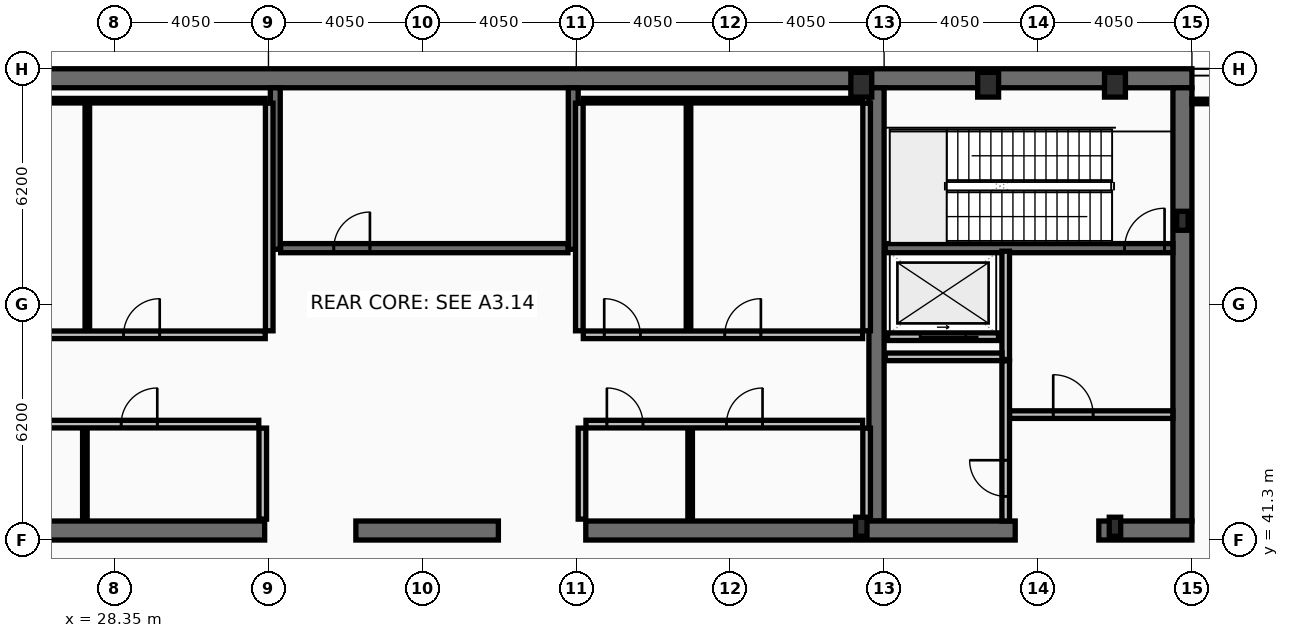
"""IFC4 building model, lengths in metres.
Left out: names, types, materials, properties, quantities, classifications, styles, units other than length and angle.
Written with IfcOpenShell. Run it as: python <this file> out.ifc"""

import sys

from ifc_helpers import new_model, si_unit, direction, frame, frame_2d, origin, origin_2d, place, context, subcontext, project, spatial, rectangle, hollow_rectangle, i_section, extrude, element, fill, save


model = new_model("IFC4")
c1 = context("Model", 3, precision=1e-05, world=origin(), true_north=direction((0.0, 1.0)))
c2 = subcontext(c1, "Body", "Model", "MODEL_VIEW")
j1 = project(units=[si_unit("LENGTHUNIT", "METRE"), si_unit("PLANEANGLEUNIT", "RADIAN")], contexts=[c1])
p1 = place(None, origin())
s1 = spatial("IfcSite", under=j1, at=p1, CompositionType="ELEMENT")
p2 = place(p1, origin())
s2 = spatial("IfcBuilding", under=s1, at=p2, CompositionType="ELEMENT")
p3 = place(p2, frame((0.0, 0.0, 361.8)))
s3 = spatial("IfcBuildingStorey", under=s2, at=p3, CompositionType="ELEMENT", Elevation=361.8)
p4 = place(p3, frame((16.2, 53.45, 0.0), z_axis=(0.0, 0.0, 1.0), x_axis=(1.0, 0.0, 0.0)))
e1 = element("IfcWall", 1, at=p4, inside=s3, PredefinedType="SHEAR", context=c2, shape_type="SweptSolid", body=[
    extrude(rectangle(XDim=40.5, YDim=0.5, at=frame_2d((20.25, 0.0))), origin(), (0.0, 0.0, 1.0), 5.4),
])
p5 = place(p3, frame((56.45, 53.2, 0.0), z_axis=(0.0, 0.0, 1.0), x_axis=(0.0, -1.0, 0.0)))
e2 = element("IfcWall", 2, at=p5, inside=s3, PredefinedType="SHEAR", context=c2, shape_type="SweptSolid", body=[
    extrude(rectangle(XDim=11.4, YDim=0.5, at=frame_2d((5.7, 0.0))), origin(), (0.0, 0.0, 1.0), 5.4),
])
p6 = place(p3, frame((48.4, 41.8, 0.0), z_axis=(0.0, 0.0, 1.0), x_axis=(0.0, 1.0, 0.0)))
e3 = element("IfcWall", 3, at=p6, inside=s3, PredefinedType="SHEAR", context=c2, shape_type="SweptSolid", body=[
    extrude(rectangle(XDim=11.4, YDim=0.4, at=frame_2d((5.7, 0.0))), origin(), (0.0, 0.0, 1.0), 5.4),
])
p7 = place(p3, frame((32.3, 41.55, 0.0), z_axis=(0.0, 0.0, 1.0), x_axis=(-1.0, 0.0, 0.0)))
e4 = element("IfcWall", 4, at=p7, inside=s3, PredefinedType="SHEAR", context=c2, shape_type="SweptSolid", body=[
    extrude(rectangle(XDim=11.45, YDim=0.5, at=frame_2d((5.725, 0.0))), origin(), (0.0, 0.0, 1.0), 5.4),
])
p8 = place(p3, frame((38.45, 41.55, 0.0), z_axis=(0.0, 0.0, 1.0), x_axis=(-1.0, 0.0, 0.0)))
e5 = element("IfcWall", 5, at=p8, inside=s3, PredefinedType="SHEAR", context=c2, shape_type="SweptSolid", body=[
    extrude(rectangle(XDim=3.75, YDim=0.5, at=frame_2d((1.875, 0.0))), origin(), (0.0, 0.0, 1.0), 5.4),
])
p9 = place(p3, frame((52.05, 41.55, 0.0), z_axis=(0.0, 0.0, 1.0), x_axis=(-1.0, 0.0, 0.0)))
e6 = element("IfcWall", 6, at=p9, inside=s3, PredefinedType="SHEAR", context=c2, shape_type="SweptSolid", body=[
    extrude(rectangle(XDim=11.3, YDim=0.5, at=frame_2d((5.65, 0.0))), origin(), (0.0, 0.0, 1.0), 5.4),
])
p10 = place(p3, frame((56.7, 41.55, 0.0), z_axis=(0.0, 0.0, 1.0), x_axis=(-1.0, 0.0, 0.0)))
e7 = element("IfcWall", 7, at=p10, inside=s3, PredefinedType="SHEAR", context=c2, shape_type="SweptSolid", body=[
    extrude(rectangle(XDim=2.45, YDim=0.5, at=frame_2d((1.225, 0.0))), origin(), (0.0, 0.0, 1.0), 5.4),
])
for number, where, z_axis, x_axis in (
    (8, (32.58, 48.95, 0.0), (0.0, 0.0, 1.0), (0.0, 1.0, 0.0)),
    (9, (40.42, 48.95, 0.0), (0.0, 0.0, 1.0), (0.0, 1.0, 0.0)),
):
    element("IfcWall", number, at=place(p3, frame(where, z_axis=z_axis, x_axis=x_axis)), inside=s3, PredefinedType="SHEAR", context=c2, shape_type="SweptSolid", body=[
        extrude(rectangle(XDim=4.25, YDim=0.26, at=frame_2d((2.125, 0.0))), origin(), (0.0, 0.0, 1.0), 5.4),
    ])
p11 = place(p3, frame((48.63, 48.98, 0.0), z_axis=(0.0, 0.0, 1.0), x_axis=(1.0, 0.0, 0.0)))
e10 = element("IfcWall", 10, at=p11, inside=s3, PredefinedType="SHEAR", context=c2, shape_type="SweptSolid", body=[
    extrude(rectangle(XDim=7.57, YDim=0.24, at=frame_2d((3.785, 0.0))), origin(), (0.0, 0.0, 1.0), 5.4),
])
p12 = place(p11, frame((6.3, 0.0, 0.0)))
e11 = element("IfcOpeningElement", 11, at=p12, cuts=e10, PredefinedType="OPENING", context=c2, shape_type="SweptSolid", body=[
    extrude(rectangle(XDim=1.05, YDim=2.15, at=frame_2d((0.525, 1.075))), frame((0.0, 0.13, 0.0), z_axis=(0.0, -1.0, 0.0), x_axis=(1.0, 0.0, 0.0)), (0.0, 0.0, 1.0), 0.26),
])
p13 = place(p3, frame((32.72, 48.98, 0.0), z_axis=(0.0, 0.0, 1.0), x_axis=(1.0, 0.0, 0.0)))
e12 = element("IfcWall", 12, at=p13, inside=s3, PredefinedType="SHEAR", context=c2, shape_type="SweptSolid", body=[
    extrude(rectangle(XDim=7.56, YDim=0.24, at=frame_2d((3.78, 0.0))), origin(), (0.0, 0.0, 1.0), 5.4),
])
p14 = place(p13, frame((1.4, 0.0, 0.0)))
e13 = element("IfcOpeningElement", 13, at=p14, cuts=e12, PredefinedType="OPENING", context=c2, shape_type="SweptSolid", body=[
    extrude(rectangle(XDim=0.95, YDim=2.1, at=frame_2d((0.475, 1.05))), frame((0.0, 0.13, 0.0), z_axis=(0.0, -1.0, 0.0), x_axis=(1.0, 0.0, 0.0)), (0.0, 0.0, 1.0), 0.26),
])
for number, where, z_axis, x_axis in (
    (14, (48.0, 53.28, 0.0), (0.0, 0.0, 1.0), (1.0, 0.0, 0.0)),
    (15, (51.337, 53.28, 0.0), (0.0, 0.0, 1.0), (1.0, 0.0, 0.0)),
    (16, (54.675, 53.28, 0.0), (0.0, 0.0, 1.0), (1.0, 0.0, 0.0)),
):
    element("IfcColumn", number, at=place(p3, frame(where, z_axis=z_axis, x_axis=x_axis)), inside=s3, PredefinedType="COLUMN", context=c2, shape_type="SweptSolid", body=[
        extrude(hollow_rectangle(XDim=0.55, YDim=0.65, WallThickness=0.04, at=origin_2d()), origin(), (0.0, 0.0, 1.0), 5.6),
    ])
for number, where, z_axis, x_axis in (
    (17, (56.45, 49.7, 0.0), (0.0, 0.0, 1.0), (1.0, 0.0, 0.0)),
    (18, (48.0, 41.65, 0.0), (0.0, 0.0, 1.0), (1.0, 0.0, 0.0)),
    (19, (54.675, 41.65, 0.0), (0.0, 0.0, 1.0), (1.0, 0.0, 0.0)),
):
    element("IfcColumn", number, at=place(p3, frame(where, z_axis=z_axis, x_axis=x_axis)), inside=s3, PredefinedType="COLUMN", context=c2, shape_type="SweptSolid", body=[
        extrude(i_section(OverallWidth=0.3, OverallDepth=0.5, WebThickness=0.014, FlangeThickness=0.028, at=origin_2d()), origin(), (0.0, 0.0, 1.0), 5.6),
    ])
p15 = place(p3, frame((51.61, 46.65, 0.0), z_axis=(0.0, 0.0, 1.0), x_axis=(-1.0, 0.0, 0.0)))
e20 = element("IfcWall", 20, at=p15, inside=s3, PredefinedType="PARTITIONING", context=c2, shape_type="SweptSolid", body=[
    extrude(rectangle(XDim=2.92, YDim=0.2, at=frame_2d((1.46, 0.0))), origin(), (0.0, 0.0, 1.0), 5.4),
])
p16 = place(p15, frame((0.86, 0.0, 0.0)))
e21 = element("IfcOpeningElement", 21, at=p16, cuts=e20, PredefinedType="OPENING", context=c2, shape_type="SweptSolid", body=[
    extrude(rectangle(XDim=1.2, YDim=2.18, at=frame_2d((0.6, 1.09))), frame((0.0, 0.11, 0.0), z_axis=(0.0, -1.0, 0.0), x_axis=(1.0, 0.0, 0.0)), (0.0, 0.0, 1.0), 0.22),
])
p17 = place(p3, frame((51.8, 46.05, 0.0), z_axis=(0.0, 0.0, 1.0), x_axis=(0.0, 1.0, 0.0)))
e22 = element("IfcWall", 22, at=p17, inside=s3, PredefinedType="PARTITIONING", context=c2, shape_type="SweptSolid", body=[
    extrude(rectangle(XDim=2.85, YDim=0.2, at=frame_2d((1.425, 0.0))), origin(), (0.0, 0.0, 1.0), 5.4),
])
p18 = place(p3, frame((51.9, 44.6, 0.0), z_axis=(0.0, 0.0, 1.0), x_axis=(1.0, 0.0, 0.0)))
e23 = element("IfcWall", 23, at=p18, inside=s3, PredefinedType="PARTITIONING", context=c2, shape_type="SweptSolid", body=[
    extrude(rectangle(XDim=4.3, YDim=0.2, at=frame_2d((2.15, 0.0))), origin(), (0.0, 0.0, 1.0), 5.4),
])
p19 = place(p18, frame((1.15, 0.0, 0.0)))
e24 = element("IfcOpeningElement", 24, at=p19, cuts=e23, PredefinedType="OPENING", context=c2, shape_type="SweptSolid", body=[
    extrude(rectangle(XDim=1.05, YDim=2.15, at=frame_2d((0.525, 1.075))), frame((0.0, 0.11, 0.0), z_axis=(0.0, -1.0, 0.0), x_axis=(1.0, 0.0, 0.0)), (0.0, 0.0, 1.0), 0.22),
])
p20 = place(p3, frame((48.63, 46.12, 0.0), z_axis=(0.0, 0.0, 1.0), x_axis=(1.0, 0.0, 0.0)))
e25 = element("IfcWall", 25, at=p20, inside=s3, PredefinedType="PARTITIONING", context=c2, shape_type="SweptSolid", body=[
    extrude(rectangle(XDim=3.07, YDim=0.2, at=frame_2d((1.535, 0.0))), origin(), (0.0, 0.0, 1.0), 5.4),
])
p21 = place(p3, frame((51.8, 41.8, 0.0), z_axis=(0.0, 0.0, 1.0), x_axis=(0.0, 1.0, 0.0)))
e26 = element("IfcWall", 26, at=p21, inside=s3, PredefinedType="PARTITIONING", context=c2, shape_type="SweptSolid", body=[
    extrude(rectangle(XDim=4.215, YDim=0.2, at=frame_2d((2.107, 0.0))), origin(), (0.0, 0.0, 1.0), 5.4),
])
p22 = place(p21, frame((0.65, 0.0, 0.0)))
e27 = element("IfcOpeningElement", 27, at=p22, cuts=e26, PredefinedType="OPENING", context=c2, shape_type="SweptSolid", body=[
    extrude(rectangle(XDim=0.95, YDim=2.1, at=frame_2d((0.475, 1.05))), frame((0.0, 0.11, 0.0), z_axis=(0.0, -1.0, 0.0), x_axis=(1.0, 0.0, 0.0)), (0.0, 0.0, 1.0), 0.22),
])
p23 = place(p3, frame((32.42, 46.805, 0.0), z_axis=(0.0, 0.0, 1.0), x_axis=(0.0, 1.0, 0.0)))
e28 = element("IfcWall", 28, at=p23, inside=s3, PredefinedType="PARTITIONING", context=c2, shape_type="SweptSolid", body=[
    extrude(rectangle(XDim=5.99, YDim=0.2, at=frame_2d((2.995, 0.0))), origin(), (0.0, 0.0, 1.0), 5.4),
])
p24 = place(p3, frame((24.805, 52.86, 0.0), z_axis=(0.0, 0.0, 1.0), x_axis=(1.0, 0.0, 0.0)))
e29 = element("IfcWall", 29, at=p24, inside=s3, PredefinedType="PARTITIONING", context=c2, shape_type="SweptSolid", body=[
    extrude(rectangle(XDim=7.51, YDim=0.12, at=frame_2d((3.755, 0.0))), origin(), (0.0, 0.0, 1.0), 5.4),
])
p25 = place(p3, frame((27.634, 46.805, 0.0), z_axis=(0.0, 0.0, 1.0), x_axis=(0.0, 1.0, 0.0)))
e30 = element("IfcWall", 30, at=p25, inside=s3, PredefinedType="PARTITIONING", context=c2, shape_type="SweptSolid", body=[
    extrude(rectangle(XDim=5.99, YDim=0.12, at=frame_2d((2.995, 0.0))), origin(), (0.0, 0.0, 1.0), 5.4),
])
p26 = place(p3, frame((24.805, 46.7, 0.0), z_axis=(0.0, 0.0, 1.0), x_axis=(1.0, 0.0, 0.0)))
e31 = element("IfcWall", 31, at=p26, inside=s3, PredefinedType="PARTITIONING", context=c2, shape_type="SweptSolid", body=[
    extrude(rectangle(XDim=7.51, YDim=0.2, at=frame_2d((3.755, 0.0))), origin(), (0.0, 0.0, 1.0), 5.4),
])
p27 = place(p26, frame((0.55, 0.0, 0.0)))
e32 = element("IfcOpeningElement", 32, at=p27, cuts=e31, PredefinedType="OPENING", context=c2, shape_type="SweptSolid", body=[
    extrude(rectangle(XDim=0.95, YDim=2.1, at=frame_2d((0.475, 1.05))), frame((0.0, 0.11, 0.0), z_axis=(0.0, -1.0, 0.0), x_axis=(1.0, 0.0, 0.0)), (0.0, 0.0, 1.0), 0.22),
])
p28 = place(p26, frame((3.784, 0.0, 0.0)))
e33 = element("IfcOpeningElement", 33, at=p28, cuts=e31, PredefinedType="OPENING", context=c2, shape_type="SweptSolid", body=[
    extrude(rectangle(XDim=0.95, YDim=2.1, at=frame_2d((0.475, 1.05))), frame((0.0, 0.11, 0.0), z_axis=(0.0, -1.0, 0.0), x_axis=(1.0, 0.0, 0.0)), (0.0, 0.0, 1.0), 0.22),
])
p29 = place(p3, frame((32.25, 41.85, 0.0), z_axis=(0.0, 0.0, 1.0), x_axis=(0.0, 1.0, 0.0)))
e34 = element("IfcWall", 34, at=p29, inside=s3, PredefinedType="PARTITIONING", context=c2, shape_type="SweptSolid", body=[
    extrude(rectangle(XDim=2.395, YDim=0.2, at=frame_2d((1.198, 0.0))), origin(), (0.0, 0.0, 1.0), 5.4),
])
p30 = place(p3, frame((27.569, 41.85, 0.0), z_axis=(0.0, 0.0, 1.0), x_axis=(0.0, 1.0, 0.0)))
e35 = element("IfcWall", 35, at=p30, inside=s3, PredefinedType="PARTITIONING", context=c2, shape_type="SweptSolid", body=[
    extrude(rectangle(XDim=2.395, YDim=0.12, at=frame_2d((1.198, 0.0))), origin(), (0.0, 0.0, 1.0), 5.4),
])
p31 = place(p3, frame((24.805, 44.35, 0.0), z_axis=(0.0, 0.0, 1.0), x_axis=(1.0, 0.0, 0.0)))
e36 = element("IfcWall", 36, at=p31, inside=s3, PredefinedType="PARTITIONING", context=c2, shape_type="SweptSolid", body=[
    extrude(rectangle(XDim=7.34, YDim=0.2, at=frame_2d((3.67, 0.0))), origin(), (0.0, 0.0, 1.0), 5.4),
])
p32 = place(p31, frame((0.55, 0.0, 0.0)))
e37 = element("IfcOpeningElement", 37, at=p32, cuts=e36, PredefinedType="OPENING", context=c2, shape_type="SweptSolid", body=[
    extrude(rectangle(XDim=0.95, YDim=2.1, at=frame_2d((0.475, 1.05))), frame((0.0, 0.11, 0.0), z_axis=(0.0, -1.0, 0.0), x_axis=(1.0, 0.0, 0.0)), (0.0, 0.0, 1.0), 0.22),
])
p33 = place(p31, frame((3.719, 0.0, 0.0)))
e38 = element("IfcOpeningElement", 38, at=p33, cuts=e36, PredefinedType="OPENING", context=c2, shape_type="SweptSolid", body=[
    extrude(rectangle(XDim=0.95, YDim=2.1, at=frame_2d((0.475, 1.05))), frame((0.0, 0.11, 0.0), z_axis=(0.0, -1.0, 0.0), x_axis=(1.0, 0.0, 0.0)), (0.0, 0.0, 1.0), 0.22),
])
for number, where, z_axis, x_axis in (
    (39, (40.58, 46.805, 0.0), (0.0, 0.0, 1.0), (0.0, 1.0, 0.0)),
    (40, (48.14, 46.805, 0.0), (0.0, 0.0, 1.0), (0.0, 1.0, 0.0)),
):
    element("IfcWall", number, at=place(p3, frame(where, z_axis=z_axis, x_axis=x_axis)), inside=s3, PredefinedType="PARTITIONING", context=c2, shape_type="SweptSolid", body=[
        extrude(rectangle(XDim=5.99, YDim=0.2, at=frame_2d((2.995, 0.0))), origin(), (0.0, 0.0, 1.0), 5.4),
    ])
p34 = place(p3, frame((40.685, 52.86, 0.0), z_axis=(0.0, 0.0, 1.0), x_axis=(1.0, 0.0, 0.0)))
e41 = element("IfcWall", 41, at=p34, inside=s3, PredefinedType="PARTITIONING", context=c2, shape_type="SweptSolid", body=[
    extrude(rectangle(XDim=7.35, YDim=0.12, at=frame_2d((3.675, 0.0))), origin(), (0.0, 0.0, 1.0), 5.4),
])
p35 = place(p3, frame((43.453, 46.805, 0.0), z_axis=(0.0, 0.0, 1.0), x_axis=(0.0, 1.0, 0.0)))
e42 = element("IfcWall", 42, at=p35, inside=s3, PredefinedType="PARTITIONING", context=c2, shape_type="SweptSolid", body=[
    extrude(rectangle(XDim=5.99, YDim=0.12, at=frame_2d((2.995, 0.0))), origin(), (0.0, 0.0, 1.0), 5.4),
])
p36 = place(p3, frame((40.685, 46.7, 0.0), z_axis=(0.0, 0.0, 1.0), x_axis=(1.0, 0.0, 0.0)))
e43 = element("IfcWall", 43, at=p36, inside=s3, PredefinedType="PARTITIONING", context=c2, shape_type="SweptSolid", body=[
    extrude(rectangle(XDim=7.35, YDim=0.2, at=frame_2d((3.675, 0.0))), origin(), (0.0, 0.0, 1.0), 5.4),
])
p37 = place(p36, frame((0.55, 0.0, 0.0)))
e44 = element("IfcOpeningElement", 44, at=p37, cuts=e43, PredefinedType="OPENING", context=c2, shape_type="SweptSolid", body=[
    extrude(rectangle(XDim=0.95, YDim=2.1, at=frame_2d((0.475, 1.05))), frame((0.0, 0.11, 0.0), z_axis=(0.0, -1.0, 0.0), x_axis=(1.0, 0.0, 0.0)), (0.0, 0.0, 1.0), 0.22),
])
p38 = place(p36, frame((3.723, 0.0, 0.0)))
e45 = element("IfcOpeningElement", 45, at=p38, cuts=e43, PredefinedType="OPENING", context=c2, shape_type="SweptSolid", body=[
    extrude(rectangle(XDim=0.95, YDim=2.1, at=frame_2d((0.475, 1.05))), frame((0.0, 0.11, 0.0), z_axis=(0.0, -1.0, 0.0), x_axis=(1.0, 0.0, 0.0)), (0.0, 0.0, 1.0), 0.22),
])
for number, where, z_axis, x_axis in (
    (46, (40.65, 41.85, 0.0), (0.0, 0.0, 1.0), (0.0, 1.0, 0.0)),
    (47, (48.14, 41.85, 0.0), (0.0, 0.0, 1.0), (0.0, 1.0, 0.0)),
):
    element("IfcWall", number, at=place(p3, frame(where, z_axis=z_axis, x_axis=x_axis)), inside=s3, PredefinedType="PARTITIONING", context=c2, shape_type="SweptSolid", body=[
        extrude(rectangle(XDim=2.395, YDim=0.2, at=frame_2d((1.198, 0.0))), origin(), (0.0, 0.0, 1.0), 5.4),
    ])
p39 = place(p3, frame((43.496, 41.85, 0.0), z_axis=(0.0, 0.0, 1.0), x_axis=(0.0, 1.0, 0.0)))
e48 = element("IfcWall", 48, at=p39, inside=s3, PredefinedType="PARTITIONING", context=c2, shape_type="SweptSolid", body=[
    extrude(rectangle(XDim=2.395, YDim=0.12, at=frame_2d((1.198, 0.0))), origin(), (0.0, 0.0, 1.0), 5.4),
])
p40 = place(p3, frame((40.755, 44.35, 0.0), z_axis=(0.0, 0.0, 1.0), x_axis=(1.0, 0.0, 0.0)))
e49 = element("IfcWall", 49, at=p40, inside=s3, PredefinedType="PARTITIONING", context=c2, shape_type="SweptSolid", body=[
    extrude(rectangle(XDim=7.28, YDim=0.2, at=frame_2d((3.64, 0.0))), origin(), (0.0, 0.0, 1.0), 5.4),
])
p41 = place(p40, frame((0.55, 0.0, 0.0)))
e50 = element("IfcOpeningElement", 50, at=p41, cuts=e49, PredefinedType="OPENING", context=c2, shape_type="SweptSolid", body=[
    extrude(rectangle(XDim=0.95, YDim=2.1, at=frame_2d((0.475, 1.05))), frame((0.0, 0.11, 0.0), z_axis=(0.0, -1.0, 0.0), x_axis=(1.0, 0.0, 0.0)), (0.0, 0.0, 1.0), 0.22),
])
p42 = place(p40, frame((3.696, 0.0, 0.0)))
e51 = element("IfcOpeningElement", 51, at=p42, cuts=e49, PredefinedType="OPENING", context=c2, shape_type="SweptSolid", body=[
    extrude(rectangle(XDim=0.95, YDim=2.1, at=frame_2d((0.475, 1.05))), frame((0.0, 0.11, 0.0), z_axis=(0.0, -1.0, 0.0), x_axis=(1.0, 0.0, 0.0)), (0.0, 0.0, 1.0), 0.22),
])
p43 = place(p3, frame((56.7, 52.84, 0.0), z_axis=(0.0, 0.0, 1.0), x_axis=(1.0, 0.0, 0.0)))
e52 = element("IfcWall", 52, at=p43, inside=s3, PredefinedType="PARTITIONING", context=c2, shape_type="SweptSolid", body=[
    extrude(rectangle(XDim=4.105, YDim=0.12, at=frame_2d((2.052, 0.0))), origin(), (0.0, 0.0, 1.0), 5.4),
])
p44 = place(p12, origin())
e53 = element("IfcDoor", 53, at=p44, inside=s3, OperationType="SINGLE_SWING_RIGHT", PredefinedType="DOOR", context=c2, shape_type="SweptSolid", body=[
    extrude(rectangle(XDim=1.05, YDim=2.15, at=frame_2d((0.525, 1.075))), frame((0.0, 0.025, 0.0), z_axis=(0.0, -1.0, 0.0), x_axis=(1.0, 0.0, 0.0)), (0.0, 0.0, 1.0), 0.05),
])
fill(e11, e53)
p45 = place(p14, origin())
e54 = element("IfcDoor", 54, at=p45, inside=s3, OperationType="SINGLE_SWING_RIGHT", PredefinedType="DOOR", context=c2, shape_type="SweptSolid", body=[
    extrude(rectangle(XDim=0.95, YDim=2.1, at=frame_2d((0.475, 1.05))), frame((0.0, 0.025, 0.0), z_axis=(0.0, -1.0, 0.0), x_axis=(1.0, 0.0, 0.0)), (0.0, 0.0, 1.0), 0.05),
])
fill(e13, e54)
p46 = place(p16, origin())
e55 = element("IfcDoor", 55, at=p46, inside=s3, OperationType="SLIDING_TO_LEFT", PredefinedType="DOOR", context=c2, shape_type="SweptSolid", body=[
    extrude(rectangle(XDim=1.2, YDim=2.18, at=frame_2d((0.6, 1.09))), frame((0.0, 0.025, 0.0), z_axis=(0.0, -1.0, 0.0), x_axis=(1.0, 0.0, 0.0)), (0.0, 0.0, 1.0), 0.05),
])
fill(e21, e55)
p47 = place(p19, origin())
e56 = element("IfcDoor", 56, at=p47, inside=s3, OperationType="SINGLE_SWING_LEFT", PredefinedType="DOOR", context=c2, shape_type="SweptSolid", body=[
    extrude(rectangle(XDim=1.05, YDim=2.15, at=frame_2d((0.525, 1.075))), frame((0.0, 0.025, 0.0), z_axis=(0.0, -1.0, 0.0), x_axis=(1.0, 0.0, 0.0)), (0.0, 0.0, 1.0), 0.05),
])
fill(e24, e56)
p48 = place(p22, origin())
e57 = element("IfcDoor", 57, at=p48, inside=s3, OperationType="SINGLE_SWING_RIGHT", PredefinedType="DOOR", context=c2, shape_type="SweptSolid", body=[
    extrude(rectangle(XDim=0.95, YDim=2.1, at=frame_2d((0.475, 1.05))), frame((0.0, 0.025, 0.0), z_axis=(0.0, -1.0, 0.0), x_axis=(1.0, 0.0, 0.0)), (0.0, 0.0, 1.0), 0.05),
])
fill(e27, e57)
p49 = place(p28, origin())
e58 = element("IfcDoor", 58, at=p49, inside=s3, OperationType="SINGLE_SWING_RIGHT", PredefinedType="DOOR", context=c2, shape_type="SweptSolid", body=[
    extrude(rectangle(XDim=0.95, YDim=2.1, at=frame_2d((0.475, 1.05))), frame((0.0, 0.025, 0.0), z_axis=(0.0, -1.0, 0.0), x_axis=(1.0, 0.0, 0.0)), (0.0, 0.0, 1.0), 0.05),
])
fill(e33, e58)
p50 = place(p33, origin())
e59 = element("IfcDoor", 59, at=p50, inside=s3, OperationType="SINGLE_SWING_RIGHT", PredefinedType="DOOR", context=c2, shape_type="SweptSolid", body=[
    extrude(rectangle(XDim=0.95, YDim=2.1, at=frame_2d((0.475, 1.05))), frame((0.0, 0.025, 0.0), z_axis=(0.0, -1.0, 0.0), x_axis=(1.0, 0.0, 0.0)), (0.0, 0.0, 1.0), 0.05),
])
fill(e38, e59)
p51 = place(p37, origin())
e60 = element("IfcDoor", 60, at=p51, inside=s3, OperationType="SINGLE_SWING_LEFT", PredefinedType="DOOR", context=c2, shape_type="SweptSolid", body=[
    extrude(rectangle(XDim=0.95, YDim=2.1, at=frame_2d((0.475, 1.05))), frame((0.0, 0.025, 0.0), z_axis=(0.0, -1.0, 0.0), x_axis=(1.0, 0.0, 0.0)), (0.0, 0.0, 1.0), 0.05),
])
fill(e44, e60)
p52 = place(p38, origin())
e61 = element("IfcDoor", 61, at=p52, inside=s3, OperationType="SINGLE_SWING_RIGHT", PredefinedType="DOOR", context=c2, shape_type="SweptSolid", body=[
    extrude(rectangle(XDim=0.95, YDim=2.1, at=frame_2d((0.475, 1.05))), frame((0.0, 0.025, 0.0), z_axis=(0.0, -1.0, 0.0), x_axis=(1.0, 0.0, 0.0)), (0.0, 0.0, 1.0), 0.05),
])
fill(e45, e61)
p53 = place(p41, origin())
e62 = element("IfcDoor", 62, at=p53, inside=s3, OperationType="SINGLE_SWING_LEFT", PredefinedType="DOOR", context=c2, shape_type="SweptSolid", body=[
    extrude(rectangle(XDim=0.95, YDim=2.1, at=frame_2d((0.475, 1.05))), frame((0.0, 0.025, 0.0), z_axis=(0.0, -1.0, 0.0), x_axis=(1.0, 0.0, 0.0)), (0.0, 0.0, 1.0), 0.05),
])
fill(e50, e62)
p54 = place(p42, origin())
e63 = element("IfcDoor", 63, at=p54, inside=s3, OperationType="SINGLE_SWING_RIGHT", PredefinedType="DOOR", context=c2, shape_type="SweptSolid", body=[
    extrude(rectangle(XDim=0.95, YDim=2.1, at=frame_2d((0.475, 1.05))), frame((0.0, 0.025, 0.0), z_axis=(0.0, -1.0, 0.0), x_axis=(1.0, 0.0, 0.0)), (0.0, 0.0, 1.0), 0.05),
])
fill(e51, e63)
save(model, sys.argv[1])
